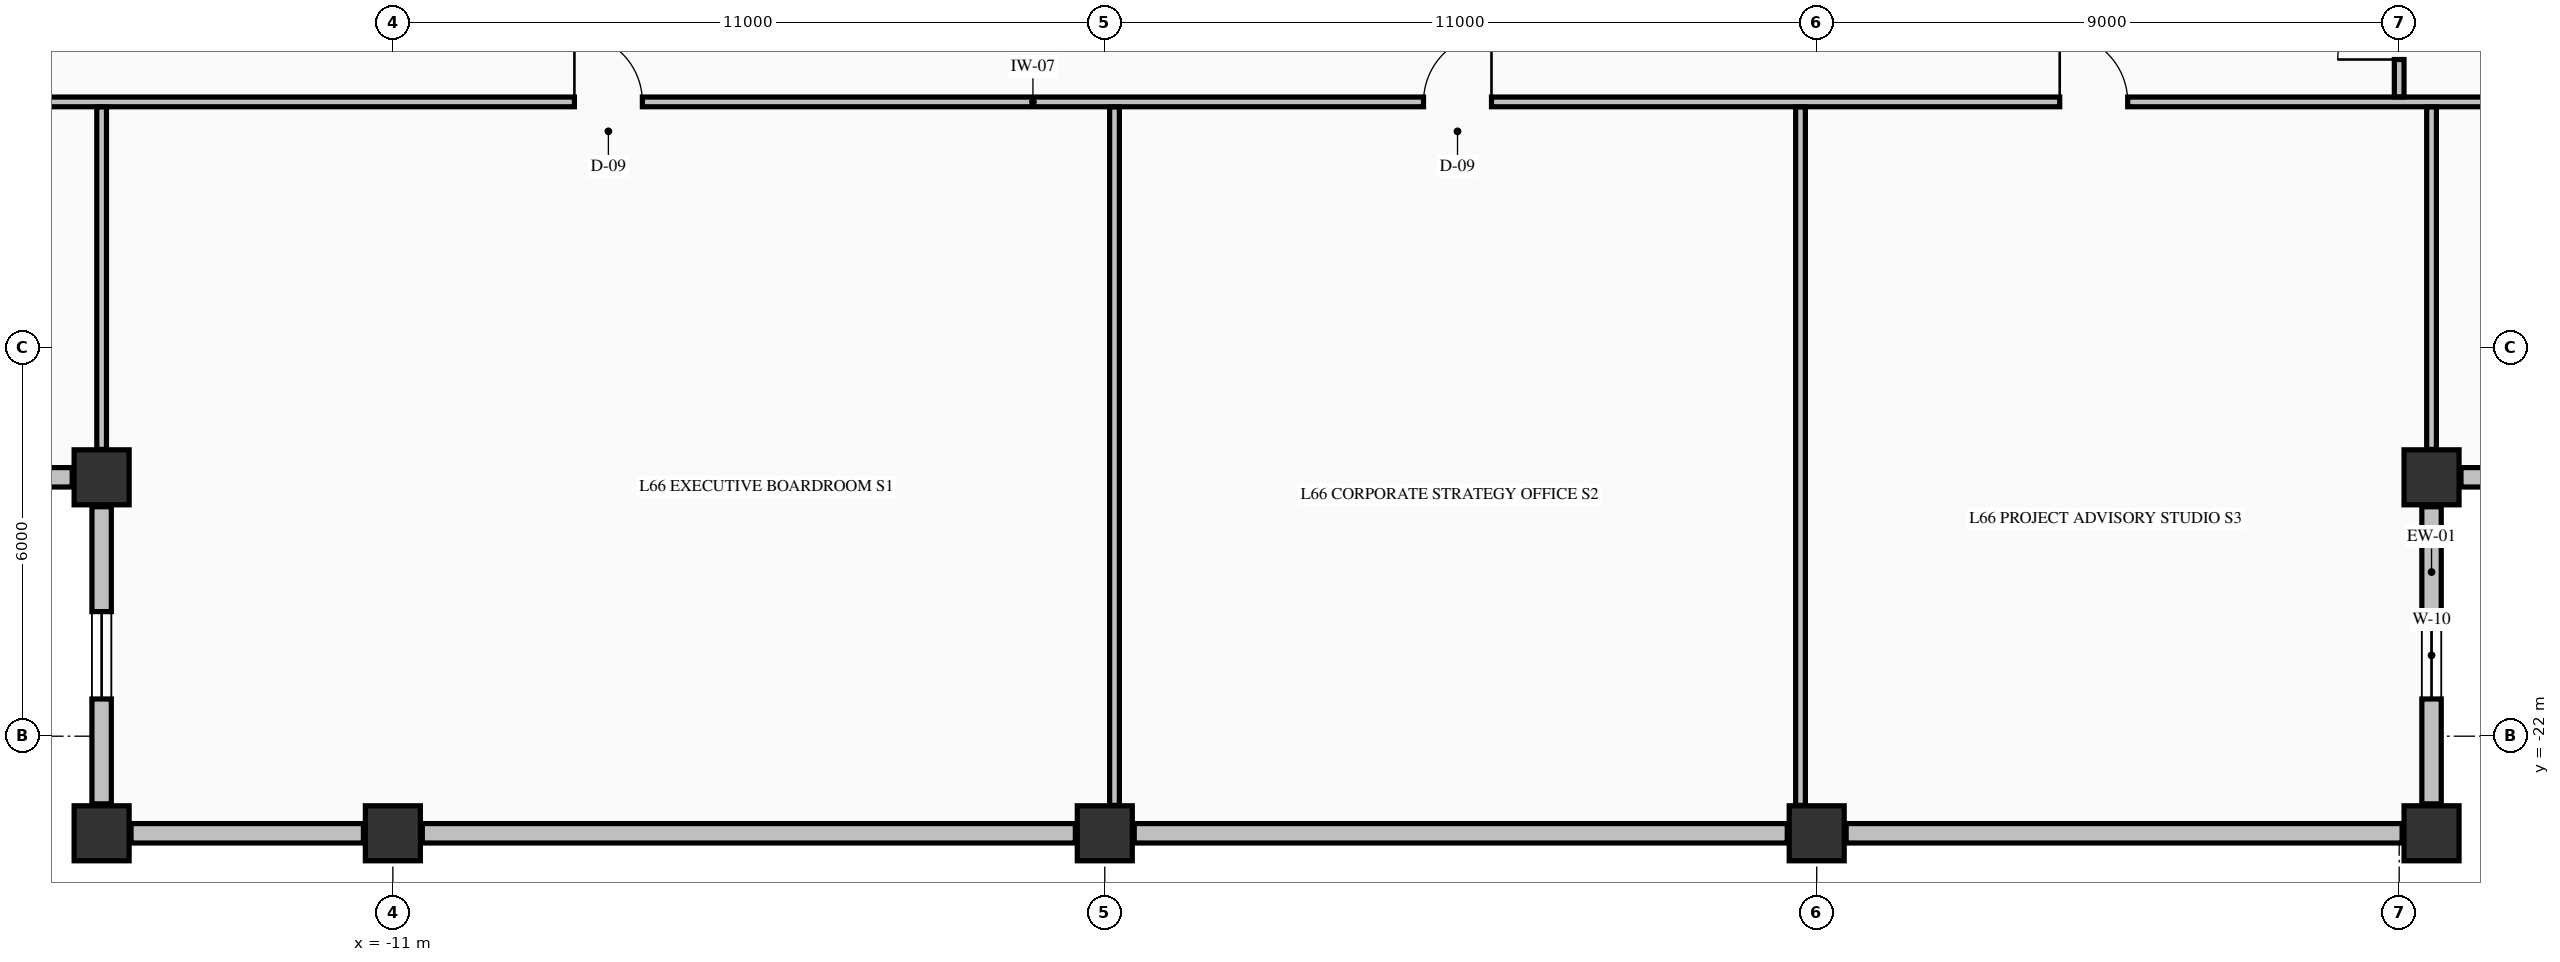
"""IFC4 building model, lengths in metres.
Left out: names, types, materials, properties, quantities, classifications, styles, units other than length and angle.
Written with IfcOpenShell. Run it as: python <this file> out.ifc"""

import sys

from ifc_helpers import new_model, si_unit, direction, frame, frame_2d, origin, origin_2d, place, context, subcontext, project, spatial, rectangle, extrude, element, fill, save


model = new_model("IFC4")
c1 = context("Model", 3, precision=1e-05, world=origin(), true_north=direction((0.0, 1.0)))
c2 = subcontext(c1, "Body", "Model", "MODEL_VIEW")
j1 = project(units=[si_unit("LENGTHUNIT", "METRE"), si_unit("PLANEANGLEUNIT", "RADIAN")], contexts=[c1])
p1 = place(None, origin())
s1 = spatial("IfcSite", under=j1, at=p1, CompositionType="ELEMENT")
p2 = place(p1, origin())
s2 = spatial("IfcBuilding", under=s1, at=p2, CompositionType="ELEMENT")
p3 = place(p2, frame((0.0, 0.0, 249.43)))
s3 = spatial("IfcBuildingStorey", under=s2, at=p3, CompositionType="ELEMENT", Elevation=249.43)
for number, where, z_axis, x_axis in (
    (1, (-15.5, -23.5, -0.425), (0.0, 0.0, 1.0), (1.0, 0.0, 0.0)),
    (2, (-11.0, -23.5, -0.425), (0.0, 0.0, 1.0), (1.0, 0.0, 0.0)),
    (3, (0.0, -23.5, -0.425), (0.0, 0.0, 1.0), (1.0, 0.0, 0.0)),
    (4, (11.0, -23.5, -0.425), (0.0, 0.0, 1.0), (1.0, 0.0, 0.0)),
    (5, (20.5, -23.5, -0.425), (0.0, 0.0, 1.0), (1.0, 0.0, 0.0)),
    (6, (-15.5, -18.0, -0.425), (0.0, 0.0, 1.0), (1.0, 0.0, 0.0)),
    (7, (20.5, -18.0, -0.425), (0.0, 0.0, 1.0), (1.0, 0.0, 0.0)),
):
    element("IfcColumn", number, at=place(p3, frame(where, z_axis=z_axis, x_axis=x_axis)), inside=s3, PredefinedType="COLUMN", context=c2, shape_type="SweptSolid", body=[
        extrude(rectangle(XDim=0.85, YDim=0.85, at=origin_2d()), origin(), (0.0, 0.0, 1.0), 5.0),
    ])
p4 = place(p3, frame((20.5, -23.045, 0.0), z_axis=(0.0, 0.0, 1.0), x_axis=(0.0, 1.0, 0.0)))
e8 = element("IfcWall", 8, at=p4, inside=s3, PredefinedType="STANDARD", context=c2, shape_type="SweptSolid", body=[
    extrude(rectangle(XDim=4.59, YDim=0.3, at=frame_2d((2.295, 0.0))), origin(), (0.0, 0.0, 1.0), 2.767),
])
p5 = place(p4, frame((1.62, 0.0, 0.68)))
e9 = element("IfcOpeningElement", 9, at=p5, cuts=e8, PredefinedType="OPENING", context=c2, shape_type="SweptSolid", body=[
    extrude(rectangle(XDim=1.35, YDim=1.42, at=frame_2d((0.675, 0.71))), frame((0.0, 0.16, 0.0), z_axis=(0.0, -1.0, 0.0), x_axis=(1.0, 0.0, 0.0)), (0.0, 0.0, 1.0), 0.32),
])
for number, where, z_axis, x_axis in (
    (10, (20.955, -18.0, 0.0), (0.0, 0.0, 1.0), (1.0, 0.0, 0.0)),
    (11, (-20.545, -18.0, 0.0), (0.0, 0.0, 1.0), (1.0, 0.0, 0.0)),
):
    element("IfcWall", number, at=place(p3, frame(where, z_axis=z_axis, x_axis=x_axis)), inside=s3, PredefinedType="STANDARD", context=c2, shape_type="SweptSolid", body=[
        extrude(rectangle(XDim=4.59, YDim=0.3, at=frame_2d((2.295, 0.0))), origin(), (0.0, 0.0, 1.0), 2.167),
    ])
p6 = place(p3, frame((-15.5, -18.455, 0.0), z_axis=(0.0, 0.0, 1.0), x_axis=(0.0, -1.0, 0.0)))
e12 = element("IfcWall", 12, at=p6, inside=s3, PredefinedType="STANDARD", context=c2, shape_type="SweptSolid", body=[
    extrude(rectangle(XDim=4.59, YDim=0.3, at=frame_2d((2.295, 0.0))), origin(), (0.0, 0.0, 1.0), 2.767),
])
p7 = place(p6, frame((1.62, 0.0, 0.68)))
e13 = element("IfcOpeningElement", 13, at=p7, cuts=e12, PredefinedType="OPENING", context=c2, shape_type="SweptSolid", body=[
    extrude(rectangle(XDim=1.35, YDim=1.42, at=frame_2d((0.675, 0.71))), frame((0.0, 0.16, 0.0), z_axis=(0.0, -1.0, 0.0), x_axis=(1.0, 0.0, 0.0)), (0.0, 0.0, 1.0), 0.32),
])
p8 = place(p3, frame((-15.045, -23.5, 0.0), z_axis=(0.0, 0.0, 1.0), x_axis=(1.0, 0.0, 0.0)))
e14 = element("IfcWall", 14, at=p8, inside=s3, PredefinedType="STANDARD", context=c2, shape_type="SweptSolid", body=[
    extrude(rectangle(XDim=3.59, YDim=0.3, at=frame_2d((1.795, 0.0))), origin(), (0.0, 0.0, 1.0), 2.167),
])
for number, where, z_axis, x_axis in (
    (15, (-10.545, -23.5, 0.0), (0.0, 0.0, 1.0), (1.0, 0.0, 0.0)),
    (16, (0.455, -23.5, 0.0), (0.0, 0.0, 1.0), (1.0, 0.0, 0.0)),
):
    element("IfcWall", number, at=place(p3, frame(where, z_axis=z_axis, x_axis=x_axis)), inside=s3, PredefinedType="STANDARD", context=c2, shape_type="SweptSolid", body=[
        extrude(rectangle(XDim=10.09, YDim=0.3, at=frame_2d((5.045, 0.0))), origin(), (0.0, 0.0, 1.0), 2.167),
    ])
p9 = place(p3, frame((11.455, -23.5, 0.0), z_axis=(0.0, 0.0, 1.0), x_axis=(1.0, 0.0, 0.0)))
e17 = element("IfcWall", 17, at=p9, inside=s3, PredefinedType="STANDARD", context=c2, shape_type="SweptSolid", body=[
    extrude(rectangle(XDim=8.59, YDim=0.3, at=frame_2d((4.295, 0.0))), origin(), (0.0, 0.0, 1.0), 2.167),
])
p10 = place(p3, frame((-20.075, -12.2, 0.0), z_axis=(0.0, 0.0, 1.0), x_axis=(1.0, 0.0, 0.0)))
e18 = element("IfcWall", 18, at=p10, inside=s3, PredefinedType="PARTITIONING", context=c2, shape_type="SweptSolid", body=[
    extrude(rectangle(XDim=45.91, YDim=0.15, at=frame_2d((22.955, 0.0))), origin(), (0.0, 0.0, 1.0), 4.575),
])
p11 = place(p10, frame((11.88, 0.0, 0.0)))
e19 = element("IfcOpeningElement", 19, at=p11, cuts=e18, PredefinedType="OPENING", context=c2, shape_type="SweptSolid", body=[
    extrude(rectangle(XDim=1.05, YDim=2.15, at=frame_2d((0.525, 1.075))), frame((0.0, 0.085, 0.0), z_axis=(0.0, -1.0, 0.0), x_axis=(1.0, 0.0, 0.0)), (0.0, 0.0, 1.0), 0.17),
])
p12 = place(p10, frame((25.0, 0.0, 0.0)))
e20 = element("IfcOpeningElement", 20, at=p12, cuts=e18, PredefinedType="OPENING", context=c2, shape_type="SweptSolid", body=[
    extrude(rectangle(XDim=1.05, YDim=2.15, at=frame_2d((0.525, 1.075))), frame((0.0, 0.085, 0.0), z_axis=(0.0, -1.0, 0.0), x_axis=(1.0, 0.0, 0.0)), (0.0, 0.0, 1.0), 0.17),
])
p13 = place(p10, frame((34.83, 0.0, 0.0)))
e21 = element("IfcOpeningElement", 21, at=p13, cuts=e18, PredefinedType="OPENING", context=c2, shape_type="SweptSolid", body=[
    extrude(rectangle(XDim=1.05, YDim=2.15, at=frame_2d((0.525, 1.075))), frame((0.0, 0.085, 0.0), z_axis=(0.0, -1.0, 0.0), x_axis=(1.0, 0.0, 0.0)), (0.0, 0.0, 1.0), 0.17),
])
p14 = place(p3, frame((-15.5, -17.569, 0.0), z_axis=(0.0, 0.0, 1.0), x_axis=(0.0, 1.0, 0.0)))
e22 = element("IfcWall", 22, at=p14, inside=s3, PredefinedType="PARTITIONING", context=c2, shape_type="SweptSolid", body=[
    extrude(rectangle(XDim=5.291, YDim=0.15, at=frame_2d((2.646, 0.0))), origin(), (0.0, 0.0, 1.0), 4.575),
])
for number, where, z_axis, x_axis in (
    (23, (0.15, -23.069, 0.0), (0.0, 0.0, 1.0), (0.0, 1.0, 0.0)),
    (24, (10.75, -23.069, 0.0), (0.0, 0.0, 1.0), (0.0, 1.0, 0.0)),
):
    element("IfcWall", number, at=place(p3, frame(where, z_axis=z_axis, x_axis=x_axis)), inside=s3, PredefinedType="PARTITIONING", context=c2, shape_type="SweptSolid", body=[
        extrude(rectangle(XDim=10.791, YDim=0.15, at=frame_2d((5.396, 0.0))), origin(), (0.0, 0.0, 1.0), 2.167),
    ])
p15 = place(p3, frame((20.0, -12.122, 0.0), z_axis=(0.0, 0.0, 1.0), x_axis=(0.0, 1.0, 0.0)))
e25 = element("IfcWall", 25, at=p15, inside=s3, PredefinedType="PARTITIONING", context=c2, shape_type="SweptSolid", body=[
    extrude(rectangle(XDim=1.816, YDim=0.15, at=frame_2d((0.908, 0.0))), origin(), (0.0, 0.0, 1.0), 4.575),
])
p16 = place(p15, frame((0.577, 0.0, 0.0)))
e26 = element("IfcOpeningElement", 26, at=p16, cuts=e25, PredefinedType="OPENING", context=c2, shape_type="SweptSolid", body=[
    extrude(rectangle(XDim=0.95, YDim=2.02, at=frame_2d((0.475, 1.01))), frame((0.0, 0.085, 0.0), z_axis=(0.0, -1.0, 0.0), x_axis=(1.0, 0.0, 0.0)), (0.0, 0.0, 1.0), 0.17),
])
p17 = place(p3, frame((20.5, -17.569, 0.0), z_axis=(0.0, 0.0, 1.0), x_axis=(0.0, 1.0, 0.0)))
e27 = element("IfcWall", 27, at=p17, inside=s3, PredefinedType="PARTITIONING", context=c2, shape_type="SweptSolid", body=[
    extrude(rectangle(XDim=5.291, YDim=0.15, at=frame_2d((2.646, 0.0))), origin(), (0.0, 0.0, 1.0), 2.167),
])
p18 = place(p5, origin())
e28 = element("IfcWindow", 28, at=p18, inside=s3, PartitioningType="SINGLE_PANEL", PredefinedType="WINDOW", context=c2, shape_type="SweptSolid", body=[
    extrude(rectangle(XDim=1.35, YDim=1.42, at=frame_2d((0.675, 0.71))), frame((0.0, 0.03, 0.0), z_axis=(0.0, -1.0, 0.0), x_axis=(1.0, 0.0, 0.0)), (0.0, 0.0, 1.0), 0.06),
])
fill(e9, e28)
p19 = place(p7, origin())
e29 = element("IfcWindow", 29, at=p19, inside=s3, PartitioningType="SINGLE_PANEL", PredefinedType="WINDOW", context=c2, shape_type="SweptSolid", body=[
    extrude(rectangle(XDim=1.35, YDim=1.42, at=frame_2d((0.675, 0.71))), frame((0.0, 0.03, 0.0), z_axis=(0.0, -1.0, 0.0), x_axis=(1.0, 0.0, 0.0)), (0.0, 0.0, 1.0), 0.06),
])
fill(e13, e29)
p20 = place(p11, origin())
e30 = element("IfcDoor", 30, at=p20, inside=s3, OperationType="SINGLE_SWING_LEFT", PredefinedType="DOOR", context=c2, shape_type="SweptSolid", body=[
    extrude(rectangle(XDim=1.05, YDim=2.15, at=frame_2d((0.525, 1.075))), frame((0.0, 0.025, 0.0), z_axis=(0.0, -1.0, 0.0), x_axis=(1.0, 0.0, 0.0)), (0.0, 0.0, 1.0), 0.05),
])
fill(e19, e30)
p21 = place(p12, origin())
e31 = element("IfcDoor", 31, at=p21, inside=s3, OperationType="SINGLE_SWING_RIGHT", PredefinedType="DOOR", context=c2, shape_type="SweptSolid", body=[
    extrude(rectangle(XDim=1.05, YDim=2.15, at=frame_2d((0.525, 1.075))), frame((0.0, 0.025, 0.0), z_axis=(0.0, -1.0, 0.0), x_axis=(1.0, 0.0, 0.0)), (0.0, 0.0, 1.0), 0.05),
])
fill(e20, e31)
p22 = place(p13, origin())
e32 = element("IfcDoor", 32, at=p22, inside=s3, OperationType="SINGLE_SWING_LEFT", PredefinedType="DOOR", context=c2, shape_type="SweptSolid", body=[
    extrude(rectangle(XDim=1.05, YDim=2.15, at=frame_2d((0.525, 1.075))), frame((0.0, 0.025, 0.0), z_axis=(0.0, -1.0, 0.0), x_axis=(1.0, 0.0, 0.0)), (0.0, 0.0, 1.0), 0.05),
])
fill(e21, e32)
p23 = place(p16, origin())
e33 = element("IfcDoor", 33, at=p23, inside=s3, OperationType="SINGLE_SWING_LEFT", PredefinedType="DOOR", context=c2, shape_type="SweptSolid", body=[
    extrude(rectangle(XDim=0.95, YDim=2.02, at=frame_2d((0.475, 1.01))), frame((0.0, 0.025, 0.0), z_axis=(0.0, -1.0, 0.0), x_axis=(1.0, 0.0, 0.0)), (0.0, 0.0, 1.0), 0.05),
])
fill(e26, e33)
save(model, sys.argv[1])
